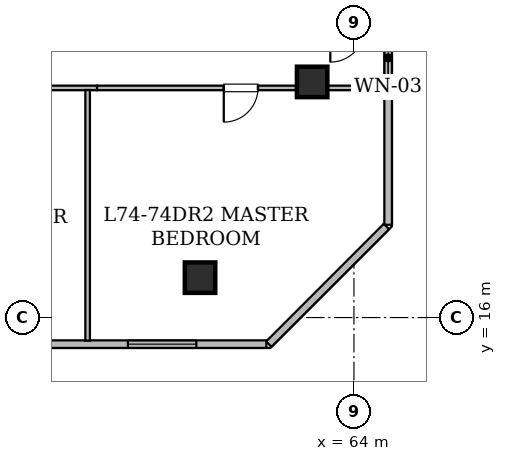
"""IFC4 building model, lengths in metres.
Left out: names, types, materials, properties, quantities, classifications, styles, units other than length and angle.
Written with IfcOpenShell. Run it as: python <this file> out.ifc"""

import sys

from ifc_helpers import new_model, si_unit, direction, frame, frame_2d, origin, origin_2d, place, context, subcontext, project, spatial, rectangle, hollow_rectangle, extrude, element, fill, save


model = new_model("IFC4")
c1 = context("Model", 3, precision=1e-05, world=origin(), true_north=direction((0.0, 1.0)))
c2 = subcontext(c1, "Body", "Model", "MODEL_VIEW")
j1 = project(units=[si_unit("LENGTHUNIT", "METRE"), si_unit("PLANEANGLEUNIT", "RADIAN")], contexts=[c1])
p1 = place(None, origin())
s1 = spatial("IfcSite", under=j1, at=p1, CompositionType="ELEMENT")
p2 = place(p1, origin())
s2 = spatial("IfcBuilding", under=s1, at=p2, CompositionType="ELEMENT")
p3 = place(p2, frame((0.0, 0.0, 290.45)))
s3 = spatial("IfcBuildingStorey", under=s2, at=p3, CompositionType="ELEMENT", Elevation=290.45)
for number, where, z_axis, x_axis in (
    (1, (59.95, 17.05, 0.0), (0.0, 0.0, 1.0), (1.0, 0.0, 0.0)),
    (2, (62.9, 22.2, 0.0), (0.0, 0.0, 1.0), (1.0, 0.0, 0.0)),
):
    element("IfcColumn", number, at=place(p3, frame(where, z_axis=z_axis, x_axis=x_axis)), inside=s3, PredefinedType="COLUMN", context=c2, shape_type="SweptSolid", body=[
        extrude(hollow_rectangle(XDim=0.8, YDim=0.8, WallThickness=0.04, at=origin_2d()), origin(), (0.0, 0.0, 1.0), 4.175),
    ])
p4 = place(p3, frame((64.9, 25.524, 0.0), z_axis=(0.0, 0.0, 1.0), x_axis=(0.0, -1.0, 0.0)))
e3 = element("IfcWall", 3, at=p4, inside=s3, PredefinedType="STANDARD", context=c2, shape_type="SweptSolid", body=[
    extrude(rectangle(XDim=7.083, YDim=0.2, at=frame_2d((3.542, 0.0))), origin(), (0.0, 0.0, 1.0), 3.78),
])
p5 = place(p4, frame((2.092, 0.0, 0.78)))
e4 = element("IfcOpeningElement", 4, at=p5, cuts=e3, PredefinedType="OPENING", context=c2, shape_type="SweptSolid", body=[
    extrude(rectangle(XDim=1.2, YDim=1.5, at=frame_2d((0.6, 0.75))), frame((0.0, 0.11, 0.0), z_axis=(0.0, -1.0, 0.0), x_axis=(1.0, 0.0, 0.0)), (0.0, 0.0, 1.0), 0.22),
])
p6 = place(p3, frame((64.855, 18.396, 0.0), z_axis=(0.0, 0.0, 1.0), x_axis=(-0.707106781187, -0.707106781187, 0.0)))
e5 = element("IfcWall", 5, at=p6, inside=s3, PredefinedType="STANDARD", context=c2, shape_type="SweptSolid", body=[
    extrude(rectangle(XDim=4.378, YDim=0.2, at=frame_2d((2.189, 0.0))), origin(), (0.0, 0.0, 1.0), 3.78),
])
p7 = place(p3, frame((61.696, 15.3, 0.0), z_axis=(0.0, 0.0, 1.0), x_axis=(-1.0, 0.0, 0.0)))
e6 = element("IfcWall", 6, at=p7, inside=s3, PredefinedType="STANDARD", context=c2, shape_type="SweptSolid", body=[
    extrude(rectangle(XDim=33.393, YDim=0.2, at=frame_2d((16.697, 0.0))), origin(), (0.0, 0.0, 1.0), 3.78),
])
p8 = place(p7, frame((26.486, 0.0, 0.85)))
e7 = element("IfcOpeningElement", 7, at=p8, cuts=e6, PredefinedType="OPENING", context=c2, shape_type="SweptSolid", body=[
    extrude(rectangle(XDim=1.8, YDim=0.92, at=frame_2d((0.9, 0.46))), frame((0.0, 0.11, 0.0), z_axis=(0.0, -1.0, 0.0), x_axis=(1.0, 0.0, 0.0)), (0.0, 0.0, 1.0), 0.22),
])
p9 = place(p7, frame((12.686, 0.0, 0.85)))
e8 = element("IfcOpeningElement", 8, at=p9, cuts=e6, PredefinedType="OPENING", context=c2, shape_type="SweptSolid", body=[
    extrude(rectangle(XDim=1.8, YDim=0.92, at=frame_2d((0.9, 0.46))), frame((0.0, 0.11, 0.0), z_axis=(0.0, -1.0, 0.0), x_axis=(1.0, 0.0, 0.0)), (0.0, 0.0, 1.0), 0.22),
])
p10 = place(p7, frame((7.048, 0.0, 0.85)))
e9 = element("IfcOpeningElement", 9, at=p10, cuts=e6, PredefinedType="OPENING", context=c2, shape_type="SweptSolid", body=[
    extrude(rectangle(XDim=1.8, YDim=0.92, at=frame_2d((0.9, 0.46))), frame((0.0, 0.11, 0.0), z_axis=(0.0, -1.0, 0.0), x_axis=(1.0, 0.0, 0.0)), (0.0, 0.0, 1.0), 0.22),
])
p11 = place(p7, frame((1.844, 0.0, 0.85)))
e10 = element("IfcOpeningElement", 10, at=p11, cuts=e6, PredefinedType="OPENING", context=c2, shape_type="SweptSolid", body=[
    extrude(rectangle(XDim=1.8, YDim=0.92, at=frame_2d((0.9, 0.46))), frame((0.0, 0.11, 0.0), z_axis=(0.0, -1.0, 0.0), x_axis=(1.0, 0.0, 0.0)), (0.0, 0.0, 1.0), 0.22),
])
p12 = place(p3, frame((57.241, 22.042, 0.0), z_axis=(0.0, 0.0, 1.0), x_axis=(-1.0, 0.0, 0.0)))
e11 = element("IfcWall", 11, at=p12, inside=s3, PredefinedType="PARTITIONING", context=c2, shape_type="SweptSolid", body=[
    extrude(rectangle(XDim=6.664, YDim=0.12, at=frame_2d((3.332, 0.0))), origin(), (0.0, 0.0, 1.0), 2.22),
])
p13 = place(p12, frame((2.903, 0.0, 0.0)))
e12 = element("IfcOpeningElement", 12, at=p13, cuts=e11, PredefinedType="OPENING", context=c2, shape_type="SweptSolid", body=[
    extrude(rectangle(XDim=0.9, YDim=2.1, at=frame_2d((0.45, 1.05))), frame((0.0, 0.07, 0.0), z_axis=(0.0, -1.0, 0.0), x_axis=(1.0, 0.0, 0.0)), (0.0, 0.0, 1.0), 0.14),
])
p14 = place(p3, frame((64.808, 22.042, 0.0), z_axis=(0.0, 0.0, 1.0), x_axis=(-1.0, 0.0, 0.0)))
e13 = element("IfcWall", 13, at=p14, inside=s3, PredefinedType="PARTITIONING", context=c2, shape_type="SweptSolid", body=[
    extrude(rectangle(XDim=7.567, YDim=0.12, at=frame_2d((3.784, 0.0))), origin(), (0.0, 0.0, 1.0), 2.22),
])
p15 = place(p14, frame((3.333, 0.0, 0.0)))
e14 = element("IfcOpeningElement", 14, at=p15, cuts=e13, PredefinedType="OPENING", context=c2, shape_type="SweptSolid", body=[
    extrude(rectangle(XDim=0.9, YDim=2.1, at=frame_2d((0.45, 1.05))), frame((0.0, 0.07, 0.0), z_axis=(0.0, -1.0, 0.0), x_axis=(1.0, 0.0, 0.0)), (0.0, 0.0, 1.0), 0.14),
])
p16 = place(p3, frame((56.992, 21.988, 0.0), z_axis=(0.0, 0.0, 1.0), x_axis=(0.0, -1.0, 0.0)))
e15 = element("IfcWall", 15, at=p16, inside=s3, PredefinedType="PARTITIONING", context=c2, shape_type="SweptSolid", body=[
    extrude(rectangle(XDim=6.596, YDim=0.12, at=frame_2d((3.298, 0.0))), origin(), (0.0, 0.0, 1.0), 2.22),
])
p17 = place(p5, origin())
e16 = element("IfcWindow", 16, at=p17, inside=s3, PartitioningType="SINGLE_PANEL", PredefinedType="WINDOW", context=c2, shape_type="SweptSolid", body=[
    extrude(rectangle(XDim=1.2, YDim=1.5, at=frame_2d((0.6, 0.75))), frame((0.0, 0.03, 0.0), z_axis=(0.0, -1.0, 0.0), x_axis=(1.0, 0.0, 0.0)), (0.0, 0.0, 1.0), 0.06),
])
fill(e4, e16)
p18 = place(p11, origin())
e17 = element("IfcWindow", 17, at=p18, inside=s3, PartitioningType="SINGLE_PANEL", PredefinedType="WINDOW", context=c2, shape_type="SweptSolid", body=[
    extrude(rectangle(XDim=1.8, YDim=0.92, at=frame_2d((0.9, 0.46))), frame((0.0, 0.03, 0.0), z_axis=(0.0, -1.0, 0.0), x_axis=(1.0, 0.0, 0.0)), (0.0, 0.0, 1.0), 0.06),
])
fill(e10, e17)
p19 = place(p15, origin())
e18 = element("IfcDoor", 18, at=p19, inside=s3, OperationType="SINGLE_SWING_RIGHT", PredefinedType="DOOR", context=c2, shape_type="SweptSolid", body=[
    extrude(rectangle(XDim=0.9, YDim=2.1, at=frame_2d((0.45, 1.05))), frame((0.0, 0.025, 0.0), z_axis=(0.0, -1.0, 0.0), x_axis=(1.0, 0.0, 0.0)), (0.0, 0.0, 1.0), 0.05),
])
fill(e14, e18)
save(model, sys.argv[1])
